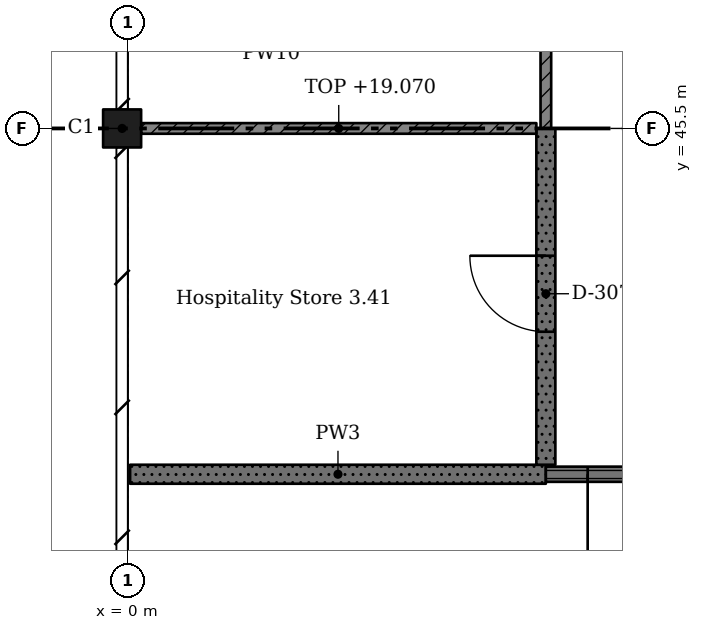
"""IFC4 building model, lengths in metres.
Left out: names, types, materials, properties, quantities, classifications, styles, units other than length and angle.
Written with IfcOpenShell. Run it as: python <this file> out.ifc"""

import sys

from ifc_helpers import new_model, si_unit, direction, frame, frame_2d, origin, origin_2d, place, context, subcontext, project, spatial, rectangle, extrude, element, fill, save


model = new_model("IFC4")
c1 = context("Model", 3, precision=1e-05, world=origin(), true_north=direction((0.0, 1.0)))
c2 = subcontext(c1, "Body", "Model", "MODEL_VIEW")
j1 = project(units=[si_unit("LENGTHUNIT", "METRE"), si_unit("PLANEANGLEUNIT", "RADIAN")], contexts=[c1])
p1 = place(None, origin())
s1 = spatial("IfcSite", under=j1, at=p1, CompositionType="ELEMENT")
p2 = place(p1, origin())
s2 = spatial("IfcBuilding", under=s1, at=p2, CompositionType="ELEMENT")
p3 = place(p2, frame((0.0, 0.0, 15.47)))
s3 = spatial("IfcBuildingStorey", under=s2, at=p3, CompositionType="ELEMENT", Elevation=15.47)
p4 = place(p3, frame((-0.075, 45.5, 0.0), z_axis=(0.0, 0.0, 1.0), x_axis=(1.0, 0.0, 0.0)))
e1 = element("IfcColumn", 1, at=p4, inside=s3, PredefinedType="COLUMN", context=c2, shape_type="SweptSolid", body=[
    extrude(rectangle(XDim=0.5, YDim=0.5, at=origin_2d()), origin(), (0.0, 0.0, 1.0), 4.55),
])
p5 = place(p3, frame((0.03, 40.95, 0.0), z_axis=(0.0, 0.0, 1.0), x_axis=(1.0, 0.0, 0.0)))
e2 = element("IfcWall", 2, at=p5, inside=s3, PredefinedType="SOLIDWALL", context=c2, shape_type="SweptSolid", body=[
    extrude(rectangle(XDim=5.47, YDim=0.25, at=frame_2d((2.735, 0.0))), origin(), (0.0, 0.0, 1.0), 4.3),
])
p6 = place(p3, frame((0.175, 45.5, 0.0), z_axis=(0.0, 0.0, 1.0), x_axis=(1.0, 0.0, 0.0)))
e3 = element("IfcWall", 3, at=p6, inside=s3, PredefinedType="SOLIDWALL", context=c2, shape_type="SweptSolid", body=[
    extrude(rectangle(XDim=5.2, YDim=0.14, at=frame_2d((2.6, 0.0))), origin(), (0.0, 0.0, 1.0), 3.6),
])
p7 = place(p3, frame((5.5, 40.95, 0.0), z_axis=(0.0, 0.0, 1.0), x_axis=(1.0, 0.0, 0.0)))
e4 = element("IfcWall", 4, at=p7, inside=s3, PredefinedType="PARTITIONING", context=c2, shape_type="SweptSolid", body=[
    extrude(rectangle(XDim=3.6, YDim=0.2, at=frame_2d((1.8, 0.0))), origin(), (0.0, 0.0, 1.0), 4.3),
])
p8 = place(p7, frame((0.55, 0.0, 0.0)))
e5 = element("IfcOpeningElement", 5, at=p8, cuts=e4, PredefinedType="OPENING", context=c2, shape_type="SweptSolid", body=[
    extrude(rectangle(XDim=2.4, YDim=2.4, at=frame_2d((1.2, 1.2))), frame((0.0, 0.11, 0.0), z_axis=(0.0, -1.0, 0.0), x_axis=(1.0, 0.0, 0.0)), (0.0, 0.0, 1.0), 0.22),
])
p9 = place(p3, frame((5.5, 41.075, 0.0), z_axis=(0.0, 0.0, 1.0), x_axis=(0.0, 1.0, 0.0)))
e6 = element("IfcWall", 6, at=p9, inside=s3, PredefinedType="SOLIDWALL", context=c2, shape_type="SweptSolid", body=[
    extrude(rectangle(XDim=4.425, YDim=0.25, at=frame_2d((2.212, 0.0))), origin(), (0.0, 0.0, 1.0), 4.3),
])
p10 = place(p9, frame((1.75, 0.0, 0.0)))
e7 = element("IfcOpeningElement", 7, at=p10, cuts=e6, PredefinedType="OPENING", context=c2, shape_type="SweptSolid", body=[
    extrude(rectangle(XDim=1.0, YDim=2.1, at=frame_2d((0.5, 1.05))), frame((0.0, 0.135, 0.0), z_axis=(0.0, -1.0, 0.0), x_axis=(1.0, 0.0, 0.0)), (0.0, 0.0, 1.0), 0.27),
])
p11 = place(p3, frame((5.5, 45.5, 0.0), z_axis=(0.0, 0.0, 1.0), x_axis=(0.0, 1.0, 0.0)))
e8 = element("IfcWall", 8, at=p11, inside=s3, PredefinedType="SOLIDWALL", context=c2, shape_type="SweptSolid", body=[
    extrude(rectangle(XDim=9.1, YDim=0.14, at=frame_2d((4.55, 0.0))), origin(), (0.0, 0.0, 1.0), 4.3),
])
p12 = place(p11, frame((3.75, 0.0, 0.0)))
e9 = element("IfcOpeningElement", 9, at=p12, cuts=e8, PredefinedType="OPENING", context=c2, shape_type="SweptSolid", body=[
    extrude(rectangle(XDim=1.5, YDim=2.1, at=frame_2d((0.75, 1.05))), frame((0.0, 0.08, 0.0), z_axis=(0.0, -1.0, 0.0), x_axis=(1.0, 0.0, 0.0)), (0.0, 0.0, 1.0), 0.16),
])
p13 = place(p10, origin())
e10 = element("IfcDoor", 10, at=p13, inside=s3, OperationType="SINGLE_SWING_LEFT", PredefinedType="DOOR", context=c2, shape_type="SweptSolid", body=[
    extrude(rectangle(XDim=1.0, YDim=2.1, at=frame_2d((0.5, 1.05))), frame((0.0, 0.025, 0.0), z_axis=(0.0, -1.0, 0.0), x_axis=(1.0, 0.0, 0.0)), (0.0, 0.0, 1.0), 0.05),
])
fill(e7, e10)
p14 = place(p8, origin())
e11 = element("IfcDoor", 11, at=p14, inside=s3, OperationType="DOUBLE_DOOR_SINGLE_SWING", PredefinedType="DOOR", context=c2, shape_type="SweptSolid", body=[
    extrude(rectangle(XDim=2.4, YDim=2.4, at=frame_2d((1.2, 1.2))), frame((0.0, 0.025, 0.0), z_axis=(0.0, -1.0, 0.0), x_axis=(1.0, 0.0, 0.0)), (0.0, 0.0, 1.0), 0.05),
])
fill(e5, e11)
save(model, sys.argv[1])
